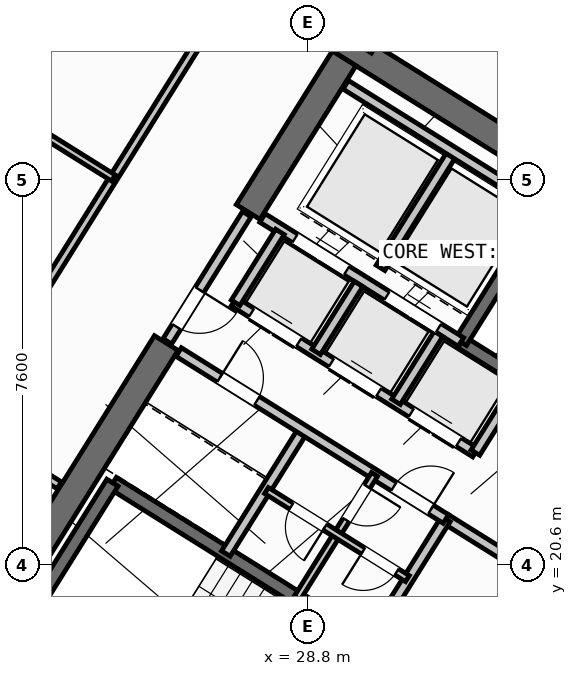
"""IFC4 building model, lengths in metres.
Left out: names, types, materials, properties, quantities, classifications, styles, units other than length and angle.
Written with IfcOpenShell. Run it as: python <this file> out.ifc"""

import sys

from ifc_helpers import new_model, si_unit, direction, frame, frame_2d, origin, origin_2d, place, context, subcontext, project, spatial, rectangle, hollow_rectangle, extrude, source, transform, mapped, element, fill, save


model = new_model("IFC4")
c1 = context("Model", 3, precision=1e-05, world=origin(), true_north=direction((0.0, 1.0)))
c2 = subcontext(c1, "Body", "Model", "MODEL_VIEW")
j1 = project(units=[si_unit("LENGTHUNIT", "METRE"), si_unit("PLANEANGLEUNIT", "RADIAN")], contexts=[c1])
p1 = place(None, origin())
s1 = spatial("IfcSite", under=j1, at=p1, CompositionType="ELEMENT")
p2 = place(p1, origin())
s2 = spatial("IfcBuilding", under=s1, at=p2, CompositionType="ELEMENT")
p3 = place(p2, frame((0.0, 0.0, 199.5)))
s3 = spatial("IfcBuildingStorey", under=s2, at=p3, CompositionType="ELEMENT", Elevation=199.5)
p4 = place(p3, frame((40.573, 24.01, 0.0), z_axis=(0.0, 0.0, 1.0), x_axis=(-0.848047359947, 0.529920442413, 0.0)))
e1 = element("IfcWall", 1, at=p4, inside=s3, PredefinedType="SHEAR", context=c2, shape_type="SweptSolid", body=[
    extrude(rectangle(XDim=13.14, YDim=0.55, at=frame_2d((6.57, 0.0))), origin(), (0.0, 0.0, 1.0), 4.25),
])
p5 = place(p3, frame((29.517, 30.594, 0.0), z_axis=(0.0, 0.0, 1.0), x_axis=(-0.529906864564, -0.848055844204, 0.0)))
e2 = element("IfcWall", 2, at=p5, inside=s3, PredefinedType="SHEAR", context=c2, shape_type="SweptSolid", body=[
    extrude(rectangle(XDim=3.575, YDim=0.55, at=frame_2d((1.788, 0.0))), origin(), (0.0, 0.0, 1.0), 4.25),
])
p6 = place(p3, frame((26.007, 24.976, 0.0), z_axis=(0.0, 0.0, 1.0), x_axis=(-0.529923795287, -0.848045264823, 0.0)))
e3 = element("IfcWall", 3, at=p6, inside=s3, PredefinedType="SHEAR", context=c2, shape_type="SweptSolid", body=[
    extrude(rectangle(XDim=6.425, YDim=0.55, at=frame_2d((3.212, 0.0))), origin(), (0.0, 0.0, 1.0), 4.25),
])
m1 = source(origin(), c2, "Body", "SweptSolid", [
    extrude(hollow_rectangle(XDim=0.8, YDim=0.8, WallThickness=0.032, at=origin_2d()), origin(), (0.0, 0.0, 1.0), 4.5),
])
p7 = place(p3, frame((29.928, 31.251, 0.0), z_axis=(0.0, 0.0, 1.0), x_axis=(-0.848048096156, 0.529919264233, 0.0)))
e4 = element("IfcColumn", 4, at=p7, inside=s3, PredefinedType="COLUMN", context=c2, shape_type="MappedRepresentation", body=[
    mapped(m1, transform((0.0, 0.0, 0.0), scale=1.0)),
])
p8 = place(p3, frame((31.76, 12.183, 0.0), z_axis=(0.0, 0.0, 1.0), x_axis=(-0.848047074256, 0.529920899612, 0.0)))
e5 = element("IfcWall", 5, at=p8, inside=s3, PredefinedType="STANDARD", context=c2, shape_type="SweptSolid", body=[
    extrude(rectangle(XDim=30.652, YDim=0.32, at=frame_2d((15.326, 0.0))), origin(), (0.0, 0.0, 1.0), 4.25),
])
p9 = place(p8, frame((15.166, 0.0, 0.0)))
e6 = element("IfcOpeningElement", 6, at=p9, cuts=e5, PredefinedType="OPENING", context=c2, shape_type="SweptSolid", body=[
    extrude(rectangle(XDim=1.2, YDim=2.15, at=frame_2d((0.6, 1.075))), frame((0.0, 0.17, 0.0), z_axis=(0.0, -1.0, 0.0), x_axis=(1.0, 0.0, 0.0)), (0.0, 0.0, 1.0), 0.34),
])
p10 = place(p8, frame((1.665, 0.0, 0.65)))
e7 = element("IfcOpeningElement", 7, at=p10, cuts=e5, PredefinedType="OPENING", context=c2, shape_type="SweptSolid", body=[
    extrude(rectangle(XDim=2.8, YDim=2.1, at=frame_2d((1.4, 1.05))), frame((0.0, 0.17, 0.0), z_axis=(0.0, -1.0, 0.0), x_axis=(1.0, 0.0, 0.0)), (0.0, 0.0, 1.0), 0.34),
])
p11 = place(p8, frame((6.894, 0.0, 0.65)))
e8 = element("IfcOpeningElement", 8, at=p11, cuts=e5, PredefinedType="OPENING", context=c2, shape_type="SweptSolid", body=[
    extrude(rectangle(XDim=2.8, YDim=2.1, at=frame_2d((1.4, 1.05))), frame((0.0, 0.17, 0.0), z_axis=(0.0, -1.0, 0.0), x_axis=(1.0, 0.0, 0.0)), (0.0, 0.0, 1.0), 0.34),
])
p12 = place(p8, frame((20.453, 0.0, 0.85)))
e9 = element("IfcOpeningElement", 9, at=p12, cuts=e5, PredefinedType="OPENING", context=c2, shape_type="SweptSolid", body=[
    extrude(rectangle(XDim=1.5, YDim=1.5, at=frame_2d((0.75, 0.75))), frame((0.0, 0.17, 0.0), z_axis=(0.0, -1.0, 0.0), x_axis=(1.0, 0.0, 0.0)), (0.0, 0.0, 1.0), 0.34),
])
p13 = place(p8, frame((26.258, 0.0, 0.65)))
e10 = element("IfcOpeningElement", 10, at=p13, cuts=e5, PredefinedType="OPENING", context=c2, shape_type="SweptSolid", body=[
    extrude(rectangle(XDim=2.8, YDim=2.1, at=frame_2d((1.4, 1.05))), frame((0.0, 0.17, 0.0), z_axis=(0.0, -1.0, 0.0), x_axis=(1.0, 0.0, 0.0)), (0.0, 0.0, 1.0), 0.34),
])
p14 = place(p3, frame((31.28, 18.261, 0.0), z_axis=(0.0, 0.0, 1.0), x_axis=(-0.848051618787, 0.529913626805, 0.0)))
e11 = element("IfcWall", 11, at=p14, inside=s3, PredefinedType="SHEAR", context=c2, shape_type="SweptSolid", body=[
    extrude(rectangle(XDim=7.46, YDim=0.26, at=frame_2d((3.73, 0.0))), origin(), (0.0, 0.0, 1.0), 4.25),
])
p15 = place(p14, frame((0.36, 0.0, 0.0)))
e12 = element("IfcOpeningElement", 12, at=p15, cuts=e11, PredefinedType="OPENING", context=c2, shape_type="SweptSolid", body=[
    extrude(rectangle(XDim=0.86, YDim=2.05, at=frame_2d((0.43, 1.025))), frame((0.0, 0.14, 0.0), z_axis=(0.0, -1.0, 0.0), x_axis=(1.0, 0.0, 0.0)), (0.0, 0.0, 1.0), 0.28),
])
p16 = place(p3, frame((24.945, 22.22, 0.0), z_axis=(0.0, 0.0, 1.0), x_axis=(-0.529908658664, -0.84805472316, 0.0)))
e13 = element("IfcWall", 13, at=p16, inside=s3, PredefinedType="SHEAR", context=c2, shape_type="SweptSolid", body=[
    extrude(rectangle(XDim=3.16, YDim=0.26, at=frame_2d((1.58, 0.0))), origin(), (0.0, 0.0, 1.0), 4.25),
])
p17 = place(p3, frame((38.046, 21.108, 0.0), z_axis=(0.0, 0.0, 1.0), x_axis=(-0.848054434086, 0.529909121291, 0.0)))
e14 = element("IfcWall", 14, at=p17, inside=s3, PredefinedType="SHEAR", context=c2, shape_type="SweptSolid", body=[
    extrude(rectangle(XDim=7.33, YDim=0.26, at=frame_2d((3.665, 0.0))), origin(), (0.0, 0.0, 1.0), 4.25),
])
p18 = place(p17, frame((0.22, 0.0, 0.0)))
e15 = element("IfcOpeningElement", 15, at=p18, cuts=e14, PredefinedType="OPENING", context=c2, shape_type="SweptSolid", body=[
    extrude(rectangle(XDim=1.1, YDim=2.1, at=frame_2d((0.55, 1.05))), frame((0.0, 0.14, 0.0), z_axis=(0.0, -1.0, 0.0), x_axis=(1.0, 0.0, 0.0)), (0.0, 0.0, 1.0), 0.28),
])
p19 = place(p3, frame((33.496, 27.677, 0.0), z_axis=(0.0, 0.0, 1.0), x_axis=(-0.529908658664, -0.84805472316, 0.0)))
e16 = element("IfcWall", 16, at=p19, inside=s3, PredefinedType="SHEAR", context=c2, shape_type="SweptSolid", body=[
    extrude(rectangle(XDim=3.16, YDim=0.26, at=frame_2d((1.58, 0.0))), origin(), (0.0, 0.0, 1.0), 4.25),
])
p20 = place(p3, frame((36.417, 18.447, 0.0), z_axis=(0.0, 0.0, 1.0), x_axis=(-0.848064879198, 0.529892404805, 0.0)))
e17 = element("IfcWall", 17, at=p20, inside=s3, PredefinedType="STANDARD", context=c2, shape_type="SweptSolid", body=[
    extrude(rectangle(XDim=5.768, YDim=0.2, at=frame_2d((2.884, 0.0))), origin(), (0.0, 0.0, 1.0), 4.24),
])
p21 = place(p20, frame((2.548, 0.0, 0.0)))
e18 = element("IfcOpeningElement", 18, at=p21, cuts=e17, PredefinedType="OPENING", context=c2, shape_type="SweptSolid", body=[
    extrude(rectangle(XDim=1.15, YDim=2.1, at=frame_2d((0.575, 1.05))), frame((0.0, 0.11, 0.0), z_axis=(0.0, -1.0, 0.0), x_axis=(1.0, 0.0, 0.0)), (0.0, 0.0, 1.0), 0.22),
])
p22 = place(p3, frame((31.822, 24.998, 0.0), z_axis=(0.0, 0.0, 1.0), x_axis=(-0.848036912365, 0.52993716162, 0.0)))
e19 = element("IfcWall", 19, at=p22, inside=s3, PredefinedType="STANDARD", context=c2, shape_type="SweptSolid", body=[
    extrude(rectangle(XDim=4.618, YDim=0.2, at=frame_2d((2.309, 0.0))), origin(), (0.0, 0.0, 1.0), 4.24),
])
p23 = place(p22, frame((0.52, 0.0, 0.0)))
e20 = element("IfcOpeningElement", 20, at=p23, cuts=e19, PredefinedType="OPENING", context=c2, shape_type="SweptSolid", body=[
    extrude(rectangle(XDim=1.2, YDim=2.15, at=frame_2d((0.6, 1.075))), frame((0.0, 0.11, 0.0), z_axis=(0.0, -1.0, 0.0), x_axis=(1.0, 0.0, 0.0)), (0.0, 0.0, 1.0), 0.22),
])
p24 = place(p22, frame((2.66, 0.0, 0.0)))
e21 = element("IfcOpeningElement", 21, at=p24, cuts=e19, PredefinedType="OPENING", context=c2, shape_type="SweptSolid", body=[
    extrude(rectangle(XDim=1.2, YDim=2.15, at=frame_2d((0.6, 1.075))), frame((0.0, 0.11, 0.0), z_axis=(0.0, -1.0, 0.0), x_axis=(1.0, 0.0, 0.0)), (0.0, 0.0, 1.0), 0.22),
])
p25 = place(p3, frame((32.108, 22.814, 0.0), z_axis=(0.0, 0.0, 1.0), x_axis=(-0.848042229521, 0.529928652696, 0.0)))
e22 = element("IfcWall", 22, at=p25, inside=s3, PredefinedType="STANDARD", context=c2, shape_type="SweptSolid", body=[
    extrude(rectangle(XDim=5.62, YDim=0.2, at=frame_2d((2.81, 0.0))), origin(), (0.0, 0.0, 1.0), 4.24),
])
p26 = place(p25, frame((0.39, 0.0, 0.0)))
e23 = element("IfcOpeningElement", 23, at=p26, cuts=e22, PredefinedType="OPENING", context=c2, shape_type="SweptSolid", body=[
    extrude(rectangle(XDim=1.1, YDim=2.15, at=frame_2d((0.55, 1.075))), frame((0.0, 0.11, 0.0), z_axis=(0.0, -1.0, 0.0), x_axis=(1.0, 0.0, 0.0)), (0.0, 0.0, 1.0), 0.22),
])
p27 = place(p25, frame((2.25, 0.0, 0.0)))
e24 = element("IfcOpeningElement", 24, at=p27, cuts=e22, PredefinedType="OPENING", context=c2, shape_type="SweptSolid", body=[
    extrude(rectangle(XDim=1.1, YDim=2.15, at=frame_2d((0.55, 1.075))), frame((0.0, 0.11, 0.0), z_axis=(0.0, -1.0, 0.0), x_axis=(1.0, 0.0, 0.0)), (0.0, 0.0, 1.0), 0.22),
])
p28 = place(p25, frame((4.11, 0.0, 0.0)))
e25 = element("IfcOpeningElement", 25, at=p28, cuts=e22, PredefinedType="OPENING", context=c2, shape_type="SweptSolid", body=[
    extrude(rectangle(XDim=1.1, YDim=2.15, at=frame_2d((0.55, 1.075))), frame((0.0, 0.11, 0.0), z_axis=(0.0, -1.0, 0.0), x_axis=(1.0, 0.0, 0.0)), (0.0, 0.0, 1.0), 0.22),
])
p29 = place(p3, frame((32.982, 24.213, 0.0), z_axis=(0.0, 0.0, 1.0), x_axis=(-0.529839334948, -0.84809803628, 0.0)))
e26 = element("IfcWall", 26, at=p29, inside=s3, PredefinedType="STANDARD", context=c2, shape_type="SweptSolid", body=[
    extrude(rectangle(XDim=1.65, YDim=0.2, at=frame_2d((0.825, 0.0))), origin(), (0.0, 0.0, 1.0), 4.24),
])
p30 = place(p3, frame((28.25, 27.17, 0.0), z_axis=(0.0, 0.0, 1.0), x_axis=(-0.529905827651, -0.848056492117, 0.0)))
e27 = element("IfcWall", 27, at=p30, inside=s3, PredefinedType="STANDARD", context=c2, shape_type="SweptSolid", body=[
    extrude(rectangle(XDim=1.65, YDim=0.2, at=frame_2d((0.825, 0.0))), origin(), (0.0, 0.0, 1.0), 4.24),
])
p31 = place(p3, frame((31.645, 28.716, 0.0), z_axis=(0.0, 0.0, 1.0), x_axis=(-0.52986693015, -0.848080795876, 0.0)))
e28 = element("IfcWall", 28, at=p31, inside=s3, PredefinedType="STANDARD", context=c2, shape_type="SweptSolid", body=[
    extrude(rectangle(XDim=2.66, YDim=0.2, at=frame_2d((1.33, 0.0))), origin(), (0.0, 0.0, 1.0), 4.24),
])
p32 = place(p3, frame((33.363, 27.69, 0.0), z_axis=(0.0, 0.0, 1.0), x_axis=(-0.848047090064, 0.529920874315, 0.0)))
e29 = element("IfcWall", 29, at=p32, inside=s3, PredefinedType="STANDARD", context=c2, shape_type="SweptSolid", body=[
    extrude(rectangle(XDim=4.498, YDim=0.2, at=frame_2d((2.249, 0.0))), origin(), (0.0, 0.0, 1.0), 4.24),
])
for number, where, z_axis, x_axis in (
    (30, (31.379, 25.156, 0.0), (0.0, 0.0, 1.0), (-0.53, -0.848, 0.0)),
    (31, (29.801, 26.142, 0.0), (0.0, 0.0, 1.0), (-0.53, -0.848, 0.0)),
):
    element("IfcWall", number, at=place(p3, frame(where, z_axis=z_axis, x_axis=x_axis)), inside=s3, PredefinedType="STANDARD", context=c2, shape_type="SweptSolid", body=[
        extrude(rectangle(XDim=1.58, YDim=0.2, at=frame_2d((0.79, 0.0))), origin(), (0.0, 0.0, 1.0), 4.24),
    ])
for number, where, z_axis, x_axis in (
    (32, (31.525, 21.504, 0.0), (0.0, 0.0, 1.0), (-0.53, -0.848, 0.0)),
    (33, (28.71, 23.263, 0.0), (0.0, 0.0, 1.0), (-0.53, -0.848, 0.0)),
):
    element("IfcWall", number, at=place(p3, frame(where, z_axis=z_axis, x_axis=x_axis)), inside=s3, PredefinedType="STANDARD", context=c2, shape_type="SweptSolid", body=[
        extrude(rectangle(XDim=2.88, YDim=0.2, at=frame_2d((1.44, 0.0))), origin(), (0.0, 0.0, 1.0), 4.24),
    ])
p33 = place(p3, frame((31.525, 21.504, 0.0), z_axis=(0.0, 0.0, 1.0), x_axis=(-0.848040211232, 0.529931882541, 0.0)))
e34 = element("IfcWall", 34, at=p33, inside=s3, PredefinedType="STANDARD", context=c2, shape_type="SweptSolid", body=[
    extrude(rectangle(XDim=6.218, YDim=0.2, at=frame_2d((3.109, 0.0))), origin(), (0.0, 0.0, 1.0), 4.24),
])
p34 = place(p33, frame((4.4, 0.0, 0.0)))
e35 = element("IfcOpeningElement", 35, at=p34, cuts=e34, PredefinedType="OPENING", context=c2, shape_type="SweptSolid", body=[
    extrude(rectangle(XDim=0.86, YDim=2.05, at=frame_2d((0.43, 1.025))), frame((0.0, 0.11, 0.0), z_axis=(0.0, -1.0, 0.0), x_axis=(1.0, 0.0, 0.0)), (0.0, 0.0, 1.0), 0.22),
])
p35 = place(p33, frame((0.35, 0.0, 0.0)))
e36 = element("IfcOpeningElement", 36, at=p35, cuts=e34, PredefinedType="OPENING", context=c2, shape_type="SweptSolid", body=[
    extrude(rectangle(XDim=0.86, YDim=2.05, at=frame_2d((0.43, 1.025))), frame((0.0, 0.11, 0.0), z_axis=(0.0, -1.0, 0.0), x_axis=(1.0, 0.0, 0.0)), (0.0, 0.0, 1.0), 0.22),
])
p36 = place(p3, frame((30.117, 22.384, 0.0), z_axis=(0.0, 0.0, 1.0), x_axis=(-0.529951914384, -0.848027693204, 0.0)))
e37 = element("IfcWall", 37, at=p36, inside=s3, PredefinedType="PLUMBINGWALL", context=c2, shape_type="SweptSolid", body=[
    extrude(rectangle(XDim=1.4, YDim=0.14, at=frame_2d((0.7, 0.0))), origin(), (0.0, 0.0, 1.0), 4.24),
])
p37 = place(p36, frame((0.28, 0.0, 0.0)))
e38 = element("IfcOpeningElement", 38, at=p37, cuts=e37, PredefinedType="OPENING", context=c2, shape_type="SweptSolid", body=[
    extrude(rectangle(XDim=0.78, YDim=2.05, at=frame_2d((0.39, 1.025))), frame((0.0, 0.08, 0.0), z_axis=(0.0, -1.0, 0.0), x_axis=(1.0, 0.0, 0.0)), (0.0, 0.0, 1.0), 0.16),
])
p38 = place(p3, frame((29.375, 21.196, 0.0), z_axis=(0.0, 0.0, 1.0), x_axis=(-0.529865479138, -0.848081702443, 0.0)))
e39 = element("IfcWall", 39, at=p38, inside=s3, PredefinedType="PLUMBINGWALL", context=c2, shape_type="SweptSolid", body=[
    extrude(rectangle(XDim=1.48, YDim=0.14, at=frame_2d((0.74, 0.0))), origin(), (0.0, 0.0, 1.0), 4.24),
])
p39 = place(p3, frame((30.766, 20.327, 0.0), z_axis=(0.0, 0.0, 1.0), x_axis=(-0.848052663127, 0.529911955482, 0.0)))
e40 = element("IfcWall", 40, at=p39, inside=s3, PredefinedType="PLUMBINGWALL", context=c2, shape_type="SweptSolid", body=[
    extrude(rectangle(XDim=3.28, YDim=0.14, at=frame_2d((1.64, 0.0))), origin(), (0.0, 0.0, 1.0), 4.24),
])
p40 = place(p39, frame((0.25, 0.0, 0.0)))
e41 = element("IfcOpeningElement", 41, at=p40, cuts=e40, PredefinedType="OPENING", context=c2, shape_type="SweptSolid", body=[
    extrude(rectangle(XDim=0.78, YDim=2.05, at=frame_2d((0.39, 1.025))), frame((0.0, 0.08, 0.0), z_axis=(0.0, -1.0, 0.0), x_axis=(1.0, 0.0, 0.0)), (0.0, 0.0, 1.0), 0.16),
])
p41 = place(p39, frame((1.92, 0.0, 0.0)))
e42 = element("IfcOpeningElement", 42, at=p41, cuts=e40, PredefinedType="OPENING", context=c2, shape_type="SweptSolid", body=[
    extrude(rectangle(XDim=0.78, YDim=2.05, at=frame_2d((0.39, 1.025))), frame((0.0, 0.08, 0.0), z_axis=(0.0, -1.0, 0.0), x_axis=(1.0, 0.0, 0.0)), (0.0, 0.0, 1.0), 0.16),
])
p42 = place(p3, frame((27.596, 27.52, 0.0), z_axis=(0.0, 0.0, 1.0), x_axis=(-0.529865479138, -0.848081702443, 0.0)))
e43 = element("IfcWall", 43, at=p42, inside=s3, PredefinedType="STANDARD", context=c2, shape_type="SweptSolid", body=[
    extrude(rectangle(XDim=2.96, YDim=0.2, at=frame_2d((1.48, 0.0))), origin(), (0.0, 0.0, 1.0), 4.24),
])
p43 = place(p42, frame((1.76, 0.0, 0.0)))
e44 = element("IfcOpeningElement", 44, at=p43, cuts=e43, PredefinedType="OPENING", context=c2, shape_type="SweptSolid", body=[
    extrude(rectangle(XDim=0.86, YDim=2.05, at=frame_2d((0.43, 1.025))), frame((0.0, 0.11, 0.0), z_axis=(0.0, -1.0, 0.0), x_axis=(1.0, 0.0, 0.0)), (0.0, 0.0, 1.0), 0.22),
])
p44 = place(p3, frame((23.896, 22.168, 0.0), z_axis=(0.0, 0.0, 1.0), x_axis=(-0.848075553449, 0.529875320846, 0.0)))
e45 = element("IfcWall", 45, at=p44, inside=s3, PredefinedType="PARTITIONING", context=c2, shape_type="SweptSolid", body=[
    extrude(rectangle(XDim=2.308, YDim=0.16, at=frame_2d((1.154, 0.0))), origin(), (0.0, 0.0, 1.0), 4.24),
])
p45 = place(p44, frame((0.648, 0.0, 0.0)))
e46 = element("IfcOpeningElement", 46, at=p45, cuts=e45, PredefinedType="OPENING", context=c2, shape_type="SweptSolid", body=[
    extrude(rectangle(XDim=0.86, YDim=2.05, at=frame_2d((0.43, 1.025))), frame((0.0, 0.09, 0.0), z_axis=(0.0, -1.0, 0.0), x_axis=(1.0, 0.0, 0.0)), (0.0, 0.0, 1.0), 0.18),
])
p46 = place(p3, frame((31.239, 38.274, 0.0), z_axis=(0.0, 0.0, 1.0), x_axis=(-0.529918877109, -0.848048338059, 0.0)))
e47 = element("IfcWall", 47, at=p46, inside=s3, PredefinedType="PARTITIONING", context=c2, shape_type="SweptSolid", body=[
    extrude(rectangle(XDim=15.35, YDim=0.16, at=frame_2d((7.675, 0.0))), origin(), (0.0, 0.0, 1.0), 4.24),
])
p47 = place(p3, frame((24.282, 34.293, 0.0), z_axis=(0.0, 0.0, 1.0), x_axis=(-0.529934553702, -0.848038542045, 0.0)))
e48 = element("IfcWall", 48, at=p47, inside=s3, PredefinedType="PARTITIONING", context=c2, shape_type="SweptSolid", body=[
    extrude(rectangle(XDim=6.476, YDim=0.16, at=frame_2d((3.238, 0.0))), origin(), (0.0, 0.0, 1.0), 3.725),
])
p48 = place(p3, frame((24.964, 28.233, 0.0), z_axis=(0.0, 0.0, 1.0), x_axis=(-0.848059820872, 0.529900500304, 0.0)))
e49 = element("IfcWall", 49, at=p48, inside=s3, PredefinedType="PLUMBINGWALL", context=c2, shape_type="SweptSolid", body=[
    extrude(rectangle(XDim=3.79, YDim=0.14, at=frame_2d((1.895, 0.0))), origin(), (0.0, 0.0, 1.0), 4.24),
])
p49 = place(p48, frame((2.23, 0.0, 0.0)))
e50 = element("IfcOpeningElement", 50, at=p49, cuts=e49, PredefinedType="OPENING", context=c2, shape_type="SweptSolid", body=[
    extrude(rectangle(XDim=0.92, YDim=2.08, at=frame_2d((0.46, 1.04))), frame((0.0, 0.08, 0.0), z_axis=(0.0, -1.0, 0.0), x_axis=(1.0, 0.0, 0.0)), (0.0, 0.0, 1.0), 0.16),
])
p50 = place(p3, frame((41.936, 26.012, 0.0), z_axis=(0.0, 0.0, 1.0), x_axis=(-0.848051154596, 0.529914369676, 0.0)))
e51 = element("IfcWall", 51, at=p50, inside=s3, PredefinedType="PARTITIONING", context=c2, shape_type="SweptSolid", body=[
    extrude(rectangle(XDim=15.57, YDim=0.16, at=frame_2d((7.785, 0.0))), origin(), (0.0, 0.0, 1.0), 4.24),
])
p51 = place(p50, frame((4.1, 0.0, 0.0)))
e52 = element("IfcOpeningElement", 52, at=p51, cuts=e51, PredefinedType="OPENING", context=c2, shape_type="SweptSolid", body=[
    extrude(rectangle(XDim=0.96, YDim=2.08, at=frame_2d((0.48, 1.04))), frame((0.0, 0.09, 0.0), z_axis=(0.0, -1.0, 0.0), x_axis=(1.0, 0.0, 0.0)), (0.0, 0.0, 1.0), 0.18),
])
p52 = place(p50, frame((8.2, 0.0, 0.0)))
e53 = element("IfcOpeningElement", 53, at=p52, cuts=e51, PredefinedType="OPENING", context=c2, shape_type="SweptSolid", body=[
    extrude(rectangle(XDim=1.7, YDim=2.2, at=frame_2d((0.85, 1.1))), frame((0.0, 0.09, 0.0), z_axis=(0.0, -1.0, 0.0), x_axis=(1.0, 0.0, 0.0)), (0.0, 0.0, 1.0), 0.18),
])
m2 = source(origin(), c2, "Body", "SweptSolid", [
    extrude(rectangle(XDim=1.2, YDim=2.15, at=frame_2d((0.6, 1.075))), frame((0.0, 0.025, 0.0), z_axis=(0.0, -1.0, 0.0), x_axis=(1.0, 0.0, 0.0)), (0.0, 0.0, 1.0), 0.05),
])
p53 = place(p23, origin())
e54 = element("IfcDoor", 54, at=p53, inside=s3, OperationType="DOUBLE_DOOR_SLIDING", PredefinedType="DOOR", context=c2, shape_type="MappedRepresentation", body=[
    mapped(m2, transform((0.0, 0.0, 0.0), scale=1.0)),
])
fill(e20, e54)
p54 = place(p24, origin())
e55 = element("IfcDoor", 55, at=p54, inside=s3, OperationType="DOUBLE_DOOR_SLIDING", PredefinedType="DOOR", context=c2, shape_type="MappedRepresentation", body=[
    mapped(m2, transform((0.0, 0.0, 0.0), scale=1.0)),
])
fill(e21, e55)
m3 = source(origin(), c2, "Body", "SweptSolid", [
    extrude(rectangle(XDim=1.1, YDim=2.15, at=frame_2d((0.55, 1.075))), frame((0.0, 0.025, 0.0), z_axis=(0.0, -1.0, 0.0), x_axis=(1.0, 0.0, 0.0)), (0.0, 0.0, 1.0), 0.05),
])
p55 = place(p26, origin())
e56 = element("IfcDoor", 56, at=p55, inside=s3, OperationType="DOUBLE_DOOR_SLIDING", PredefinedType="DOOR", context=c2, shape_type="MappedRepresentation", body=[
    mapped(m3, transform((0.0, 0.0, 0.0), scale=1.0)),
])
fill(e23, e56)
p56 = place(p27, origin())
e57 = element("IfcDoor", 57, at=p56, inside=s3, OperationType="DOUBLE_DOOR_SLIDING", PredefinedType="DOOR", context=c2, shape_type="MappedRepresentation", body=[
    mapped(m3, transform((0.0, 0.0, 0.0), scale=1.0)),
])
fill(e24, e57)
p57 = place(p28, origin())
e58 = element("IfcDoor", 58, at=p57, inside=s3, OperationType="DOUBLE_DOOR_SLIDING", PredefinedType="DOOR", context=c2, shape_type="MappedRepresentation", body=[
    mapped(m3, transform((0.0, 0.0, 0.0), scale=1.0)),
])
fill(e25, e58)
m4 = source(origin(), c2, "Body", "SweptSolid", [
    extrude(rectangle(XDim=0.86, YDim=2.05, at=frame_2d((0.43, 1.025))), frame((0.0, 0.025, 0.0), z_axis=(0.0, -1.0, 0.0), x_axis=(1.0, 0.0, 0.0)), (0.0, 0.0, 1.0), 0.05),
])
p58 = place(p34, frame((0.86, 0.0, 0.0), z_axis=(0.0, 0.0, 1.0), x_axis=(-1.0, 0.0, 0.0)))
e59 = element("IfcDoor", 59, at=p58, inside=s3, OperationType="SINGLE_SWING_LEFT", PredefinedType="DOOR", context=c2, shape_type="MappedRepresentation", body=[
    mapped(m4, transform((0.0, 0.0, 0.0), scale=1.0)),
])
fill(e35, e59)
p59 = place(p35, frame((0.86, 0.0, 0.0), z_axis=(0.0, 0.0, 1.0), x_axis=(-1.0, 0.0, 0.0)))
e60 = element("IfcDoor", 60, at=p59, inside=s3, OperationType="SINGLE_SWING_RIGHT", PredefinedType="DOOR", context=c2, shape_type="MappedRepresentation", body=[
    mapped(m4, transform((0.0, 0.0, 0.0), scale=1.0)),
])
fill(e36, e60)
m5 = source(origin(), c2, "Body", "SweptSolid", [
    extrude(rectangle(XDim=0.78, YDim=2.05, at=frame_2d((0.39, 1.025))), frame((0.0, 0.025, 0.0), z_axis=(0.0, -1.0, 0.0), x_axis=(1.0, 0.0, 0.0)), (0.0, 0.0, 1.0), 0.05),
])
p60 = place(p37, origin())
e61 = element("IfcDoor", 61, at=p60, inside=s3, OperationType="SINGLE_SWING_LEFT", PredefinedType="DOOR", context=c2, shape_type="MappedRepresentation", body=[
    mapped(m5, transform((0.0, 0.0, 0.0), scale=1.0)),
])
fill(e38, e61)
p61 = place(p40, origin())
e62 = element("IfcDoor", 62, at=p61, inside=s3, OperationType="SINGLE_SWING_RIGHT", PredefinedType="DOOR", context=c2, shape_type="MappedRepresentation", body=[
    mapped(m5, transform((0.0, 0.0, 0.0), scale=1.0)),
])
fill(e41, e62)
p62 = place(p41, origin())
e63 = element("IfcDoor", 63, at=p62, inside=s3, OperationType="SINGLE_SWING_LEFT", PredefinedType="DOOR", context=c2, shape_type="MappedRepresentation", body=[
    mapped(m5, transform((0.0, 0.0, 0.0), scale=1.0)),
])
fill(e42, e63)
p63 = place(p43, origin())
e64 = element("IfcDoor", 64, at=p63, inside=s3, OperationType="SINGLE_SWING_LEFT", PredefinedType="DOOR", context=c2, shape_type="MappedRepresentation", body=[
    mapped(m4, transform((0.0, 0.0, 0.0), scale=1.0)),
])
fill(e44, e64)
save(model, sys.argv[1])
